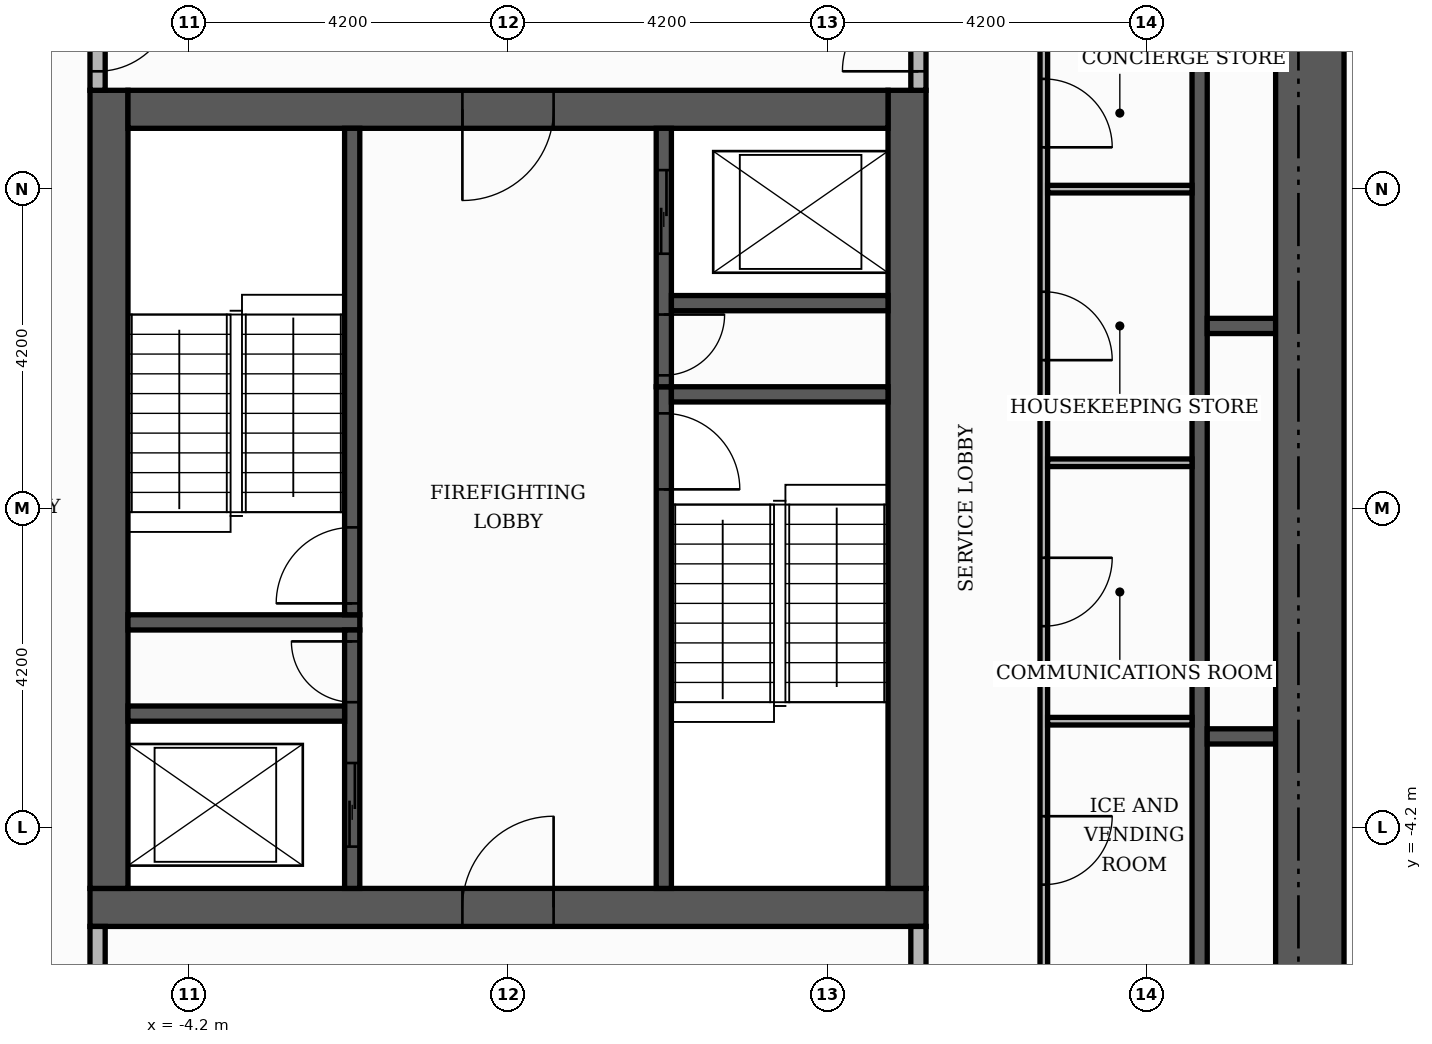
"""IFC4 building model, lengths in metres.
Left out: names, types, materials, properties, quantities, classifications, styles, units other than length and angle.
Written with IfcOpenShell. Run it as: python <this file> out.ifc"""

import sys

from ifc_helpers import new_model, si_unit, direction, frame, frame_2d, origin, place, context, subcontext, project, spatial, rectangle, extrude, element, fill, save


model = new_model("IFC4")
c1 = context("Model", 3, precision=1e-05, world=origin(), true_north=direction((0.0, 1.0)))
c2 = subcontext(c1, "Body", "Model", "MODEL_VIEW")
j1 = project(units=[si_unit("LENGTHUNIT", "METRE"), si_unit("PLANEANGLEUNIT", "RADIAN")], contexts=[c1])
p1 = place(None, origin())
s1 = spatial("IfcSite", under=j1, at=p1, CompositionType="ELEMENT")
p2 = place(p1, origin())
s2 = spatial("IfcBuilding", under=s1, at=p2, CompositionType="ELEMENT")
p3 = place(p2, frame((0.0, 0.0, 102.6)))
s3 = spatial("IfcBuildingStorey", under=s2, at=p3, CompositionType="ELEMENT", Elevation=102.6)
p4 = place(p3, frame((-5.5, -5.25, 0.0), z_axis=(0.0, 0.0, 1.0), x_axis=(1.0, 0.0, 0.0)))
e1 = element("IfcWall", 1, at=p4, inside=s3, PredefinedType="SHEAR", context=c2, shape_type="SweptSolid", body=[
    extrude(rectangle(XDim=11.0, YDim=0.5, at=frame_2d((5.5, 0.0))), origin(), (0.0, 0.0, 1.0), 3.48),
])
p5 = place(p4, frame((4.9, 0.0, 0.0)))
e2 = element("IfcOpeningElement", 2, at=p5, cuts=e1, PredefinedType="OPENING", context=c2, shape_type="SweptSolid", body=[
    extrude(rectangle(XDim=1.2, YDim=2.1, at=frame_2d((0.6, 1.05))), frame((0.0, 0.26, 0.0), z_axis=(0.0, -1.0, 0.0), x_axis=(1.0, 0.0, 0.0)), (0.0, 0.0, 1.0), 0.52),
])
for number, where, z_axis, x_axis in (
    (3, (-5.25, -5.0, 0.0), (0.0, 0.0, 1.0), (0.0, 1.0, 0.0)),
    (4, (5.25, -5.0, 0.0), (0.0, 0.0, 1.0), (0.0, 1.0, 0.0)),
):
    element("IfcWall", number, at=place(p3, frame(where, z_axis=z_axis, x_axis=x_axis)), inside=s3, PredefinedType="SHEAR", context=c2, shape_type="SweptSolid", body=[
        extrude(rectangle(XDim=10.5, YDim=0.5, at=frame_2d((5.25, 0.0))), origin(), (0.0, 0.0, 1.0), 3.48),
    ])
p6 = place(p3, frame((-5.0, 5.25, 0.0), z_axis=(0.0, 0.0, 1.0), x_axis=(1.0, 0.0, 0.0)))
e5 = element("IfcWall", 5, at=p6, inside=s3, PredefinedType="SHEAR", context=c2, shape_type="SweptSolid", body=[
    extrude(rectangle(XDim=10.0, YDim=0.5, at=frame_2d((5.0, 0.0))), origin(), (0.0, 0.0, 1.0), 3.48),
])
p7 = place(p6, frame((4.4, 0.0, 0.0)))
e6 = element("IfcOpeningElement", 6, at=p7, cuts=e5, PredefinedType="OPENING", context=c2, shape_type="SweptSolid", body=[
    extrude(rectangle(XDim=1.2, YDim=2.1, at=frame_2d((0.6, 1.05))), frame((0.0, 0.26, 0.0), z_axis=(0.0, -1.0, 0.0), x_axis=(1.0, 0.0, 0.0)), (0.0, 0.0, 1.0), 0.52),
])
p8 = place(p3, frame((2.05, -5.0, 0.0), z_axis=(0.0, 0.0, 1.0), x_axis=(0.0, 1.0, 0.0)))
e7 = element("IfcWall", 7, at=p8, inside=s3, PredefinedType="SHEAR", context=c2, shape_type="SweptSolid", body=[
    extrude(rectangle(XDim=6.6, YDim=0.2, at=frame_2d((3.3, 0.0))), origin(), (0.0, 0.0, 1.0), 3.48),
])
p9 = place(p8, frame((5.25, 0.0, 0.0)))
e8 = element("IfcOpeningElement", 8, at=p9, cuts=e7, PredefinedType="OPENING", context=c2, shape_type="SweptSolid", body=[
    extrude(rectangle(XDim=1.0, YDim=2.1, at=frame_2d((0.5, 1.05))), frame((0.0, 0.11, 0.0), z_axis=(0.0, -1.0, 0.0), x_axis=(1.0, 0.0, 0.0)), (0.0, 0.0, 1.0), 0.22),
])
p10 = place(p3, frame((-5.0, -1.5, 0.0), z_axis=(0.0, 0.0, 1.0), x_axis=(1.0, 0.0, 0.0)))
e9 = element("IfcWall", 9, at=p10, inside=s3, PredefinedType="SHEAR", context=c2, shape_type="SweptSolid", body=[
    extrude(rectangle(XDim=3.05, YDim=0.2, at=frame_2d((1.525, 0.0))), origin(), (0.0, 0.0, 1.0), 3.48),
])
p11 = place(p3, frame((-2.05, -1.4, 0.0), z_axis=(0.0, 0.0, 1.0), x_axis=(0.0, 1.0, 0.0)))
e10 = element("IfcWall", 10, at=p11, inside=s3, PredefinedType="SHEAR", context=c2, shape_type="SweptSolid", body=[
    extrude(rectangle(XDim=6.4, YDim=0.2, at=frame_2d((3.2, 0.0))), origin(), (0.0, 0.0, 1.0), 3.48),
])
p12 = place(p11, frame((0.15, 0.0, 0.0)))
e11 = element("IfcOpeningElement", 11, at=p12, cuts=e10, PredefinedType="OPENING", context=c2, shape_type="SweptSolid", body=[
    extrude(rectangle(XDim=1.0, YDim=2.1, at=frame_2d((0.5, 1.05))), frame((0.0, 0.11, 0.0), z_axis=(0.0, -1.0, 0.0), x_axis=(1.0, 0.0, 0.0)), (0.0, 0.0, 1.0), 0.22),
])
p13 = place(p3, frame((2.15, 1.5, 0.0), z_axis=(0.0, 0.0, 1.0), x_axis=(1.0, 0.0, 0.0)))
e12 = element("IfcWall", 12, at=p13, inside=s3, PredefinedType="SHEAR", context=c2, shape_type="SweptSolid", body=[
    extrude(rectangle(XDim=2.85, YDim=0.2, at=frame_2d((1.425, 0.0))), origin(), (0.0, 0.0, 1.0), 3.48),
])
p14 = place(p3, frame((9.1, -8.2, 0.0), z_axis=(0.0, 0.0, 1.0), x_axis=(0.0, 1.0, 0.0)))
e13 = element("IfcWall", 13, at=p14, inside=s3, PredefinedType="SHEAR", context=c2, shape_type="SweptSolid", body=[
    extrude(rectangle(XDim=16.4, YDim=0.2, at=frame_2d((8.2, 0.0))), origin(), (0.0, 0.0, 1.0), 3.48),
])
p15 = place(p3, frame((-2.05, -5.0, 0.0), z_axis=(0.0, 0.0, 1.0), x_axis=(0.0, 1.0, 0.0)))
e14 = element("IfcWall", 14, at=p15, inside=s3, PredefinedType="SHEAR", context=c2, shape_type="SweptSolid", body=[
    extrude(rectangle(XDim=3.4, YDim=0.2, at=frame_2d((1.7, 0.0))), origin(), (0.0, 0.0, 1.0), 3.48),
])
p16 = place(p15, frame((0.55, 0.0, 0.0)))
e15 = element("IfcOpeningElement", 15, at=p16, cuts=e14, PredefinedType="OPENING", context=c2, shape_type="SweptSolid", body=[
    extrude(rectangle(XDim=1.1, YDim=2.1, at=frame_2d((0.55, 1.05))), frame((0.0, 0.11, 0.0), z_axis=(0.0, -1.0, 0.0), x_axis=(1.0, 0.0, 0.0)), (0.0, 0.0, 1.0), 0.22),
])
p17 = place(p15, frame((2.45, 0.0, 0.0)))
e16 = element("IfcOpeningElement", 16, at=p17, cuts=e14, PredefinedType="OPENING", context=c2, shape_type="SweptSolid", body=[
    extrude(rectangle(XDim=0.8, YDim=2.1, at=frame_2d((0.4, 1.05))), frame((0.0, 0.11, 0.0), z_axis=(0.0, -1.0, 0.0), x_axis=(1.0, 0.0, 0.0)), (0.0, 0.0, 1.0), 0.22),
])
p18 = place(p3, frame((9.2, -3.0, 0.0), z_axis=(0.0, 0.0, 1.0), x_axis=(1.0, 0.0, 0.0)))
e17 = element("IfcWall", 17, at=p18, inside=s3, PredefinedType="SHEAR", context=c2, shape_type="SweptSolid", body=[
    extrude(rectangle(XDim=0.9, YDim=0.2, at=frame_2d((0.45, 0.0))), origin(), (0.0, 0.0, 1.0), 3.48),
])
p19 = place(p3, frame((-5.0, -2.7, 0.0), z_axis=(0.0, 0.0, 1.0), x_axis=(1.0, 0.0, 0.0)))
e18 = element("IfcWall", 18, at=p19, inside=s3, PredefinedType="SHEAR", context=c2, shape_type="SweptSolid", body=[
    extrude(rectangle(XDim=2.85, YDim=0.2, at=frame_2d((1.425, 0.0))), origin(), (0.0, 0.0, 1.0), 3.48),
])
p20 = place(p3, frame((2.05, 1.6, 0.0), z_axis=(0.0, 0.0, 1.0), x_axis=(0.0, 1.0, 0.0)))
e19 = element("IfcWall", 19, at=p20, inside=s3, PredefinedType="SHEAR", context=c2, shape_type="SweptSolid", body=[
    extrude(rectangle(XDim=3.4, YDim=0.2, at=frame_2d((1.7, 0.0))), origin(), (0.0, 0.0, 1.0), 3.48),
])
p21 = place(p20, frame((1.75, 0.0, 0.0)))
e20 = element("IfcOpeningElement", 20, at=p21, cuts=e19, PredefinedType="OPENING", context=c2, shape_type="SweptSolid", body=[
    extrude(rectangle(XDim=1.1, YDim=2.1, at=frame_2d((0.55, 1.05))), frame((0.0, 0.11, 0.0), z_axis=(0.0, -1.0, 0.0), x_axis=(1.0, 0.0, 0.0)), (0.0, 0.0, 1.0), 0.22),
])
p22 = place(p20, frame((0.15, 0.0, 0.0)))
e21 = element("IfcOpeningElement", 21, at=p22, cuts=e19, PredefinedType="OPENING", context=c2, shape_type="SweptSolid", body=[
    extrude(rectangle(XDim=0.8, YDim=2.1, at=frame_2d((0.4, 1.05))), frame((0.0, 0.11, 0.0), z_axis=(0.0, -1.0, 0.0), x_axis=(1.0, 0.0, 0.0)), (0.0, 0.0, 1.0), 0.22),
])
p23 = place(p3, frame((9.2, 2.4, 0.0), z_axis=(0.0, 0.0, 1.0), x_axis=(1.0, 0.0, 0.0)))
e22 = element("IfcWall", 22, at=p23, inside=s3, PredefinedType="SHEAR", context=c2, shape_type="SweptSolid", body=[
    extrude(rectangle(XDim=0.9, YDim=0.2, at=frame_2d((0.45, 0.0))), origin(), (0.0, 0.0, 1.0), 3.48),
])
p24 = place(p3, frame((2.15, 2.7, 0.0), z_axis=(0.0, 0.0, 1.0), x_axis=(1.0, 0.0, 0.0)))
e23 = element("IfcWall", 23, at=p24, inside=s3, PredefinedType="SHEAR", context=c2, shape_type="SweptSolid", body=[
    extrude(rectangle(XDim=2.85, YDim=0.2, at=frame_2d((1.425, 0.0))), origin(), (0.0, 0.0, 1.0), 3.48),
])
p25 = place(p3, frame((10.55, -10.1, 0.0), z_axis=(0.0, 0.0, 1.0), x_axis=(0.0, 1.0, 0.0)))
e24 = element("IfcWall", 24, at=p25, inside=s3, PredefinedType="SHEAR", context=c2, shape_type="SweptSolid", body=[
    extrude(rectangle(XDim=20.2, YDim=0.9, at=frame_2d((10.1, 0.0))), origin(), (0.0, 0.0, 1.0), 3.48),
])
p26 = place(p3, frame((-5.4, -10.1, 0.0), z_axis=(0.0, 0.0, 1.0), x_axis=(0.0, 1.0, 0.0)))
e25 = element("IfcWall", 25, at=p26, inside=s3, PredefinedType="PARTITIONING", context=c2, shape_type="SweptSolid", body=[
    extrude(rectangle(XDim=4.6, YDim=0.2, at=frame_2d((2.3, 0.0))), origin(), (0.0, 0.0, 1.0), 3.48),
])
p27 = place(p26, frame((2.9, 0.0, 0.0)))
e26 = element("IfcOpeningElement", 26, at=p27, cuts=e25, PredefinedType="OPENING", context=c2, shape_type="SweptSolid", body=[
    extrude(rectangle(XDim=1.0, YDim=2.1, at=frame_2d((0.5, 1.05))), frame((0.0, 0.11, 0.0), z_axis=(0.0, -1.0, 0.0), x_axis=(1.0, 0.0, 0.0)), (0.0, 0.0, 1.0), 0.22),
])
p28 = place(p3, frame((7.05, -8.2, 0.0), z_axis=(0.0, 0.0, 1.0), x_axis=(0.0, 1.0, 0.0)))
e27 = element("IfcWall", 27, at=p28, inside=s3, PredefinedType="PARTITIONING", context=c2, shape_type="SweptSolid", body=[
    extrude(rectangle(XDim=16.4, YDim=0.1, at=frame_2d((8.2, 0.0))), origin(), (0.0, 0.0, 1.0), 3.48),
])
p29 = place(p28, frame((0.5, 0.0, 0.0)))
e28 = element("IfcOpeningElement", 28, at=p29, cuts=e27, PredefinedType="OPENING", context=c2, shape_type="SweptSolid", body=[
    extrude(rectangle(XDim=1.0, YDim=2.1, at=frame_2d((0.5, 1.05))), frame((0.0, 0.06, 0.0), z_axis=(0.0, -1.0, 0.0), x_axis=(1.0, 0.0, 0.0)), (0.0, 0.0, 1.0), 0.12),
])
p30 = place(p28, frame((3.25, 0.0, 0.0)))
e29 = element("IfcOpeningElement", 29, at=p30, cuts=e27, PredefinedType="OPENING", context=c2, shape_type="SweptSolid", body=[
    extrude(rectangle(XDim=0.9, YDim=2.1, at=frame_2d((0.45, 1.05))), frame((0.0, 0.06, 0.0), z_axis=(0.0, -1.0, 0.0), x_axis=(1.0, 0.0, 0.0)), (0.0, 0.0, 1.0), 0.12),
])
p31 = place(p28, frame((6.65, 0.0, 0.0)))
e30 = element("IfcOpeningElement", 30, at=p31, cuts=e27, PredefinedType="OPENING", context=c2, shape_type="SweptSolid", body=[
    extrude(rectangle(XDim=0.9, YDim=2.1, at=frame_2d((0.45, 1.05))), frame((0.0, 0.06, 0.0), z_axis=(0.0, -1.0, 0.0), x_axis=(1.0, 0.0, 0.0)), (0.0, 0.0, 1.0), 0.12),
])
p32 = place(p28, frame((10.15, 0.0, 0.0)))
e31 = element("IfcOpeningElement", 31, at=p32, cuts=e27, PredefinedType="OPENING", context=c2, shape_type="SweptSolid", body=[
    extrude(rectangle(XDim=0.9, YDim=2.1, at=frame_2d((0.45, 1.05))), frame((0.0, 0.06, 0.0), z_axis=(0.0, -1.0, 0.0), x_axis=(1.0, 0.0, 0.0)), (0.0, 0.0, 1.0), 0.12),
])
p33 = place(p28, frame((12.95, 0.0, 0.0)))
e32 = element("IfcOpeningElement", 32, at=p33, cuts=e27, PredefinedType="OPENING", context=c2, shape_type="SweptSolid", body=[
    extrude(rectangle(XDim=0.9, YDim=2.1, at=frame_2d((0.45, 1.05))), frame((0.0, 0.06, 0.0), z_axis=(0.0, -1.0, 0.0), x_axis=(1.0, 0.0, 0.0)), (0.0, 0.0, 1.0), 0.12),
])
p34 = place(p28, frame((14.95, 0.0, 0.0)))
e33 = element("IfcOpeningElement", 33, at=p34, cuts=e27, PredefinedType="OPENING", context=c2, shape_type="SweptSolid", body=[
    extrude(rectangle(XDim=0.9, YDim=2.1, at=frame_2d((0.45, 1.05))), frame((0.0, 0.06, 0.0), z_axis=(0.0, -1.0, 0.0), x_axis=(1.0, 0.0, 0.0)), (0.0, 0.0, 1.0), 0.12),
])
p35 = place(p3, frame((5.4, -7.9, 0.0), z_axis=(0.0, 0.0, 1.0), x_axis=(0.0, 1.0, 0.0)))
e34 = element("IfcWall", 34, at=p35, inside=s3, PredefinedType="PARTITIONING", context=c2, shape_type="SweptSolid", body=[
    extrude(rectangle(XDim=2.4, YDim=0.2, at=frame_2d((1.2, 0.0))), origin(), (0.0, 0.0, 1.0), 3.48),
])
p36 = place(p35, frame((0.7, 0.0, 0.0)))
e35 = element("IfcOpeningElement", 35, at=p36, cuts=e34, PredefinedType="OPENING", context=c2, shape_type="SweptSolid", body=[
    extrude(rectangle(XDim=1.0, YDim=2.1, at=frame_2d((0.5, 1.05))), frame((0.0, 0.11, 0.0), z_axis=(0.0, -1.0, 0.0), x_axis=(1.0, 0.0, 0.0)), (0.0, 0.0, 1.0), 0.22),
])
for number, where, z_axis, x_axis in (
    (36, (7.1, -2.8, 0.0), (0.0, 0.0, 1.0), (1.0, 0.0, 0.0)),
    (37, (7.1, 0.6, 0.0), (0.0, 0.0, 1.0), (1.0, 0.0, 0.0)),
    (38, (7.1, 4.2, 0.0), (0.0, 0.0, 1.0), (1.0, 0.0, 0.0)),
):
    element("IfcWall", number, at=place(p3, frame(where, z_axis=z_axis, x_axis=x_axis)), inside=s3, PredefinedType="PARTITIONING", context=c2, shape_type="SweptSolid", body=[
        extrude(rectangle(XDim=1.9, YDim=0.1, at=frame_2d((0.95, 0.0))), origin(), (0.0, 0.0, 1.0), 3.48),
    ])
p37 = place(p3, frame((-5.4, 5.5, 0.0), z_axis=(0.0, 0.0, 1.0), x_axis=(0.0, 1.0, 0.0)))
e39 = element("IfcWall", 39, at=p37, inside=s3, PredefinedType="PARTITIONING", context=c2, shape_type="SweptSolid", body=[
    extrude(rectangle(XDim=1.55, YDim=0.2, at=frame_2d((0.775, 0.0))), origin(), (0.0, 0.0, 1.0), 3.48),
])
p38 = place(p37, frame((0.25, 0.0, 0.0)))
e40 = element("IfcOpeningElement", 40, at=p38, cuts=e39, PredefinedType="OPENING", context=c2, shape_type="SweptSolid", body=[
    extrude(rectangle(XDim=1.0, YDim=2.1, at=frame_2d((0.5, 1.05))), frame((0.0, 0.11, 0.0), z_axis=(0.0, -1.0, 0.0), x_axis=(1.0, 0.0, 0.0)), (0.0, 0.0, 1.0), 0.22),
])
p39 = place(p3, frame((5.4, 5.5, 0.0), z_axis=(0.0, 0.0, 1.0), x_axis=(0.0, 1.0, 0.0)))
e41 = element("IfcWall", 41, at=p39, inside=s3, PredefinedType="PARTITIONING", context=c2, shape_type="SweptSolid", body=[
    extrude(rectangle(XDim=4.6, YDim=0.2, at=frame_2d((2.3, 0.0))), origin(), (0.0, 0.0, 1.0), 3.48),
])
p40 = place(p39, frame((0.25, 0.0, 0.0)))
e42 = element("IfcOpeningElement", 42, at=p40, cuts=e41, PredefinedType="OPENING", context=c2, shape_type="SweptSolid", body=[
    extrude(rectangle(XDim=1.0, YDim=2.1, at=frame_2d((0.5, 1.05))), frame((0.0, 0.11, 0.0), z_axis=(0.0, -1.0, 0.0), x_axis=(1.0, 0.0, 0.0)), (0.0, 0.0, 1.0), 0.22),
])
p41 = place(p21, origin())
e43 = element("IfcDoor", 43, at=p41, inside=s3, OperationType="SLIDING_TO_LEFT", PredefinedType="DOOR", context=c2, shape_type="SweptSolid", body=[
    extrude(rectangle(XDim=1.1, YDim=2.1, at=frame_2d((0.55, 1.05))), frame((0.0, 0.025, 0.0), z_axis=(0.0, -1.0, 0.0), x_axis=(1.0, 0.0, 0.0)), (0.0, 0.0, 1.0), 0.05),
])
fill(e20, e43)
p42 = place(p16, origin())
e44 = element("IfcDoor", 44, at=p42, inside=s3, OperationType="SLIDING_TO_LEFT", PredefinedType="DOOR", context=c2, shape_type="SweptSolid", body=[
    extrude(rectangle(XDim=1.1, YDim=2.1, at=frame_2d((0.55, 1.05))), frame((0.0, 0.025, 0.0), z_axis=(0.0, -1.0, 0.0), x_axis=(1.0, 0.0, 0.0)), (0.0, 0.0, 1.0), 0.05),
])
fill(e15, e44)
p43 = place(p12, origin())
e45 = element("IfcDoor", 45, at=p43, inside=s3, OperationType="SINGLE_SWING_LEFT", PredefinedType="DOOR", context=c2, shape_type="SweptSolid", body=[
    extrude(rectangle(XDim=1.0, YDim=2.1, at=frame_2d((0.5, 1.05))), frame((0.0, 0.025, 0.0), z_axis=(0.0, -1.0, 0.0), x_axis=(1.0, 0.0, 0.0)), (0.0, 0.0, 1.0), 0.05),
])
fill(e11, e45)
p44 = place(p9, frame((1.0, 0.0, 0.0), z_axis=(0.0, 0.0, 1.0), x_axis=(-1.0, 0.0, 0.0)))
e46 = element("IfcDoor", 46, at=p44, inside=s3, OperationType="SINGLE_SWING_LEFT", PredefinedType="DOOR", context=c2, shape_type="SweptSolid", body=[
    extrude(rectangle(XDim=1.0, YDim=2.1, at=frame_2d((0.5, 1.05))), frame((0.0, 0.025, 0.0), z_axis=(0.0, -1.0, 0.0), x_axis=(1.0, 0.0, 0.0)), (0.0, 0.0, 1.0), 0.05),
])
fill(e8, e46)
p45 = place(p22, frame((0.8, 0.0, 0.0), z_axis=(0.0, 0.0, 1.0), x_axis=(-1.0, 0.0, 0.0)))
e47 = element("IfcDoor", 47, at=p45, inside=s3, OperationType="SINGLE_SWING_RIGHT", PredefinedType="DOOR", context=c2, shape_type="SweptSolid", body=[
    extrude(rectangle(XDim=0.8, YDim=2.1, at=frame_2d((0.4, 1.05))), frame((0.0, 0.025, 0.0), z_axis=(0.0, -1.0, 0.0), x_axis=(1.0, 0.0, 0.0)), (0.0, 0.0, 1.0), 0.05),
])
fill(e21, e47)
p46 = place(p17, origin())
e48 = element("IfcDoor", 48, at=p46, inside=s3, OperationType="SINGLE_SWING_RIGHT", PredefinedType="DOOR", context=c2, shape_type="SweptSolid", body=[
    extrude(rectangle(XDim=0.8, YDim=2.1, at=frame_2d((0.4, 1.05))), frame((0.0, 0.025, 0.0), z_axis=(0.0, -1.0, 0.0), x_axis=(1.0, 0.0, 0.0)), (0.0, 0.0, 1.0), 0.05),
])
fill(e16, e48)
p47 = place(p7, frame((1.2, 0.0, 0.0), z_axis=(0.0, 0.0, 1.0), x_axis=(-1.0, 0.0, 0.0)))
e49 = element("IfcDoor", 49, at=p47, inside=s3, OperationType="SINGLE_SWING_LEFT", PredefinedType="DOOR", context=c2, shape_type="SweptSolid", body=[
    extrude(rectangle(XDim=1.2, YDim=2.1, at=frame_2d((0.6, 1.05))), frame((0.0, 0.025, 0.0), z_axis=(0.0, -1.0, 0.0), x_axis=(1.0, 0.0, 0.0)), (0.0, 0.0, 1.0), 0.05),
])
fill(e6, e49)
p48 = place(p5, origin())
e50 = element("IfcDoor", 50, at=p48, inside=s3, OperationType="SINGLE_SWING_RIGHT", PredefinedType="DOOR", context=c2, shape_type="SweptSolid", body=[
    extrude(rectangle(XDim=1.2, YDim=2.1, at=frame_2d((0.6, 1.05))), frame((0.0, 0.025, 0.0), z_axis=(0.0, -1.0, 0.0), x_axis=(1.0, 0.0, 0.0)), (0.0, 0.0, 1.0), 0.05),
])
fill(e2, e50)
p49 = place(p38, frame((1.0, 0.0, 0.0), z_axis=(0.0, 0.0, 1.0), x_axis=(-1.0, 0.0, 0.0)))
e51 = element("IfcDoor", 51, at=p49, inside=s3, OperationType="SINGLE_SWING_RIGHT", PredefinedType="DOOR", context=c2, shape_type="SweptSolid", body=[
    extrude(rectangle(XDim=1.0, YDim=2.1, at=frame_2d((0.5, 1.05))), frame((0.0, 0.025, 0.0), z_axis=(0.0, -1.0, 0.0), x_axis=(1.0, 0.0, 0.0)), (0.0, 0.0, 1.0), 0.05),
])
fill(e40, e51)
p50 = place(p40, origin())
e52 = element("IfcDoor", 52, at=p50, inside=s3, OperationType="SINGLE_SWING_LEFT", PredefinedType="DOOR", context=c2, shape_type="SweptSolid", body=[
    extrude(rectangle(XDim=1.0, YDim=2.1, at=frame_2d((0.5, 1.05))), frame((0.0, 0.025, 0.0), z_axis=(0.0, -1.0, 0.0), x_axis=(1.0, 0.0, 0.0)), (0.0, 0.0, 1.0), 0.05),
])
fill(e42, e52)
p51 = place(p30, frame((0.9, 0.0, 0.0), z_axis=(0.0, 0.0, 1.0), x_axis=(-1.0, 0.0, 0.0)))
e53 = element("IfcDoor", 53, at=p51, inside=s3, OperationType="SINGLE_SWING_RIGHT", PredefinedType="DOOR", context=c2, shape_type="SweptSolid", body=[
    extrude(rectangle(XDim=0.9, YDim=2.1, at=frame_2d((0.45, 1.05))), frame((0.0, 0.025, 0.0), z_axis=(0.0, -1.0, 0.0), x_axis=(1.0, 0.0, 0.0)), (0.0, 0.0, 1.0), 0.05),
])
fill(e29, e53)
p52 = place(p31, frame((0.9, 0.0, 0.0), z_axis=(0.0, 0.0, 1.0), x_axis=(-1.0, 0.0, 0.0)))
e54 = element("IfcDoor", 54, at=p52, inside=s3, OperationType="SINGLE_SWING_RIGHT", PredefinedType="DOOR", context=c2, shape_type="SweptSolid", body=[
    extrude(rectangle(XDim=0.9, YDim=2.1, at=frame_2d((0.45, 1.05))), frame((0.0, 0.025, 0.0), z_axis=(0.0, -1.0, 0.0), x_axis=(1.0, 0.0, 0.0)), (0.0, 0.0, 1.0), 0.05),
])
fill(e30, e54)
p53 = place(p32, frame((0.9, 0.0, 0.0), z_axis=(0.0, 0.0, 1.0), x_axis=(-1.0, 0.0, 0.0)))
e55 = element("IfcDoor", 55, at=p53, inside=s3, OperationType="SINGLE_SWING_LEFT", PredefinedType="DOOR", context=c2, shape_type="SweptSolid", body=[
    extrude(rectangle(XDim=0.9, YDim=2.1, at=frame_2d((0.45, 1.05))), frame((0.0, 0.025, 0.0), z_axis=(0.0, -1.0, 0.0), x_axis=(1.0, 0.0, 0.0)), (0.0, 0.0, 1.0), 0.05),
])
fill(e31, e55)
p54 = place(p33, frame((0.9, 0.0, 0.0), z_axis=(0.0, 0.0, 1.0), x_axis=(-1.0, 0.0, 0.0)))
e56 = element("IfcDoor", 56, at=p54, inside=s3, OperationType="SINGLE_SWING_LEFT", PredefinedType="DOOR", context=c2, shape_type="SweptSolid", body=[
    extrude(rectangle(XDim=0.9, YDim=2.1, at=frame_2d((0.45, 1.05))), frame((0.0, 0.025, 0.0), z_axis=(0.0, -1.0, 0.0), x_axis=(1.0, 0.0, 0.0)), (0.0, 0.0, 1.0), 0.05),
])
fill(e32, e56)
save(model, sys.argv[1])
